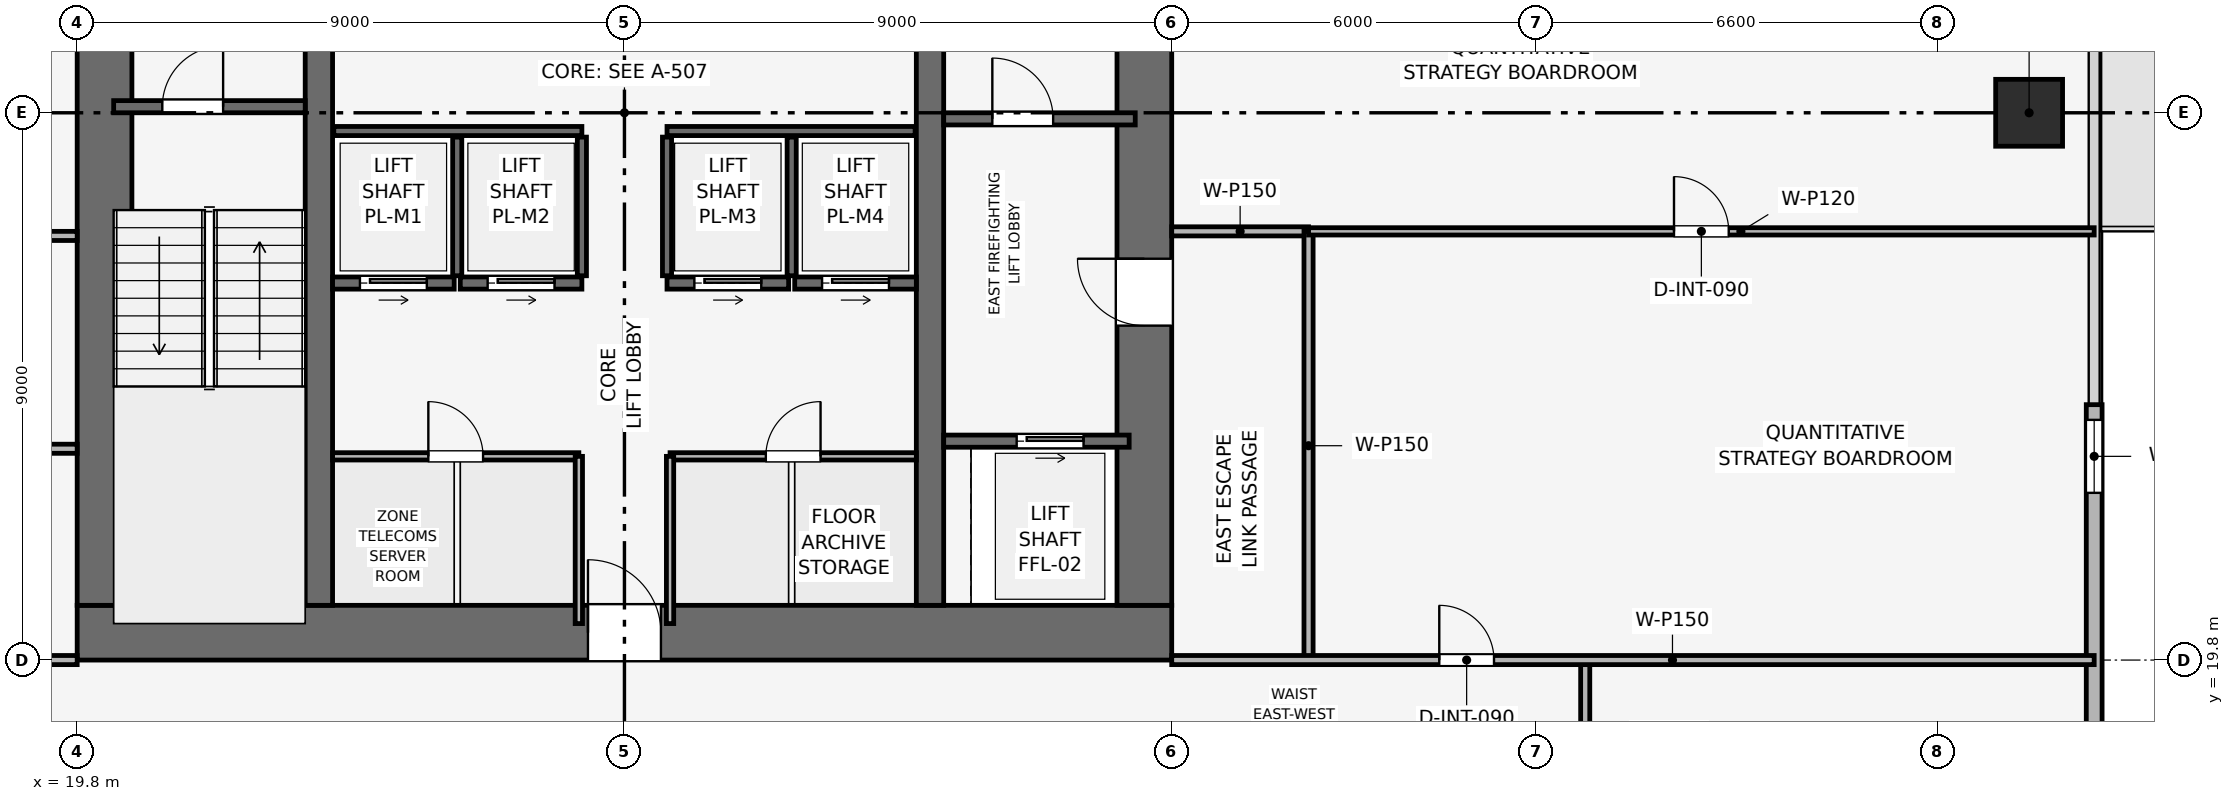
"""IFC4 building model, lengths in metres.
Left out: names, types, materials, properties, quantities, classifications, styles, units other than length and angle.
Written with IfcOpenShell. Run it as: python <this file> out.ifc"""

import sys

from ifc_helpers import new_model, si_unit, direction, frame, frame_2d, origin, origin_2d, place, context, subcontext, project, spatial, rectangle, extrude, element, fill, save


model = new_model("IFC4")
c1 = context("Model", 3, precision=1e-05, world=origin(), true_north=direction((0.0, 1.0)))
c2 = subcontext(c1, "Body", "Model", "MODEL_VIEW")
j1 = project(units=[si_unit("LENGTHUNIT", "METRE"), si_unit("PLANEANGLEUNIT", "RADIAN")], contexts=[c1])
p1 = place(None, origin())
s1 = spatial("IfcSite", under=j1, at=p1, CompositionType="ELEMENT")
p2 = place(p1, origin())
s2 = spatial("IfcBuilding", under=s1, at=p2, CompositionType="ELEMENT")
p3 = place(p2, frame((0.0, 0.0, 142.05)))
s3 = spatial("IfcBuildingStorey", under=s2, at=p3, CompositionType="ELEMENT", Elevation=142.05)
p4 = place(p3, frame((19.8, 20.25, 0.0), z_axis=(0.0, 0.0, 1.0), x_axis=(1.0, 0.0, 0.0)))
e1 = element("IfcWall", 1, at=p4, inside=s3, PredefinedType="SHEAR", context=c2, shape_type="SweptSolid", body=[
    extrude(rectangle(XDim=18.0, YDim=0.9, at=frame_2d((9.0, 0.0))), origin(), (0.0, 0.0, 1.0), 3.75),
])
p5 = place(p4, frame((8.4, 0.0, 0.0)))
e2 = element("IfcOpeningElement", 2, at=p5, cuts=e1, PredefinedType="OPENING", context=c2, shape_type="SweptSolid", body=[
    extrude(rectangle(XDim=1.2, YDim=2.2, at=frame_2d((0.6, 1.1))), frame((0.0, 0.46, 0.0), z_axis=(0.0, -1.0, 0.0), x_axis=(1.0, 0.0, 0.0)), (0.0, 0.0, 1.0), 0.92),
])
p6 = place(p3, frame((20.25, 20.7, 0.0), z_axis=(0.0, 0.0, 1.0), x_axis=(0.0, 1.0, 0.0)))
e3 = element("IfcWall", 3, at=p6, inside=s3, PredefinedType="SHEAR", context=c2, shape_type="SweptSolid", body=[
    extrude(rectangle(XDim=16.2, YDim=0.9, at=frame_2d((8.1, 0.0))), origin(), (0.0, 0.0, 1.0), 3.75),
])
p7 = place(p6, frame((10.1, 0.0, 0.0)))
e4 = element("IfcOpeningElement", 4, at=p7, cuts=e3, PredefinedType="OPENING", context=c2, shape_type="SweptSolid", body=[
    extrude(rectangle(XDim=1.1, YDim=2.15, at=frame_2d((0.55, 1.075))), frame((0.0, 0.46, 0.0), z_axis=(0.0, -1.0, 0.0), x_axis=(1.0, 0.0, 0.0)), (0.0, 0.0, 1.0), 0.92),
])
p8 = place(p3, frame((37.35, 20.7, 0.0), z_axis=(0.0, 0.0, 1.0), x_axis=(0.0, 1.0, 0.0)))
e5 = element("IfcWall", 5, at=p8, inside=s3, PredefinedType="SHEAR", context=c2, shape_type="SweptSolid", body=[
    extrude(rectangle(XDim=16.2, YDim=0.9, at=frame_2d((8.1, 0.0))), origin(), (0.0, 0.0, 1.0), 3.75),
])
p9 = place(p8, frame((4.6, 0.0, 0.0)))
e6 = element("IfcOpeningElement", 6, at=p9, cuts=e5, PredefinedType="OPENING", context=c2, shape_type="SweptSolid", body=[
    extrude(rectangle(XDim=1.1, YDim=2.15, at=frame_2d((0.55, 1.075))), frame((0.0, 0.46, 0.0), z_axis=(0.0, -1.0, 0.0), x_axis=(1.0, 0.0, 0.0)), (0.0, 0.0, 1.0), 0.92),
])
for number, where, z_axis, x_axis in (
    (7, (23.775, 20.7, 0.0), (0.0, 0.0, 1.0), (0.0, 1.0, 0.0)),
    (8, (33.825, 20.7, 0.0), (0.0, 0.0, 1.0), (0.0, 1.0, 0.0)),
):
    element("IfcWall", number, at=place(p3, frame(where, z_axis=z_axis, x_axis=x_axis)), inside=s3, PredefinedType="SHEAR", context=c2, shape_type="SweptSolid", body=[
        extrude(rectangle(XDim=16.2, YDim=0.45, at=frame_2d((8.1, 0.0))), origin(), (0.0, 0.0, 1.0), 3.75),
    ])
p10 = place(p3, frame((51.9, 28.8, 0.003), z_axis=(0.0, 0.0, 1.0), x_axis=(1.0, 0.0, 0.0)))
e9 = element("IfcColumn", 9, at=p10, inside=s3, PredefinedType="COLUMN", context=c2, shape_type="SweptSolid", body=[
    extrude(rectangle(XDim=1.1, YDim=1.1, at=origin_2d()), origin(), (0.0, 0.0, 1.0), 3.489),
])
p11 = place(p3, frame((52.97, 24.0, 0.0), z_axis=(0.0, 0.0, 1.0), x_axis=(0.0, -1.0, 0.0)))
e10 = element("IfcWall", 10, at=p11, inside=s3, PredefinedType="SOLIDWALL", context=c2, shape_type="SweptSolid", body=[
    extrude(rectangle(XDim=12.6, YDim=0.26, at=frame_2d((6.3, 0.0))), origin(), (0.0, 0.0, 1.0), 3.495),
])
p12 = place(p11, frame((0.25, 0.0, 0.9)))
e11 = element("IfcOpeningElement", 11, at=p12, cuts=e10, PredefinedType="OPENING", context=c2, shape_type="SweptSolid", body=[
    extrude(rectangle(XDim=1.2, YDim=2.1, at=frame_2d((0.6, 1.05))), frame((0.0, 0.14, 0.0), z_axis=(0.0, -1.0, 0.0), x_axis=(1.0, 0.0, 0.0)), (0.0, 0.0, 1.0), 0.28),
])
p13 = place(p3, frame((20.4, 28.9, 0.0), z_axis=(0.0, 0.0, 1.0), x_axis=(1.0, 0.0, 0.0)))
e12 = element("IfcWall", 12, at=p13, inside=s3, PredefinedType="SHEAR", context=c2, shape_type="SweptSolid", body=[
    extrude(rectangle(XDim=3.15, YDim=0.2, at=frame_2d((1.575, 0.0))), origin(), (0.0, 0.0, 1.0), 3.495),
])
p14 = place(p13, frame((0.8, 0.0, 0.0)))
e13 = element("IfcOpeningElement", 13, at=p14, cuts=e12, PredefinedType="OPENING", context=c2, shape_type="SweptSolid", body=[
    extrude(rectangle(XDim=1.0, YDim=2.1, at=frame_2d((0.5, 1.05))), frame((0.0, 0.11, 0.0), z_axis=(0.0, -1.0, 0.0), x_axis=(1.0, 0.0, 0.0)), (0.0, 0.0, 1.0), 0.22),
])
p15 = place(p3, frame((34.05, 28.7, 0.0), z_axis=(0.0, 0.0, 1.0), x_axis=(1.0, 0.0, 0.0)))
e14 = element("IfcWall", 14, at=p15, inside=s3, PredefinedType="SHEAR", context=c2, shape_type="SweptSolid", body=[
    extrude(rectangle(XDim=3.15, YDim=0.2, at=frame_2d((1.575, 0.0))), origin(), (0.0, 0.0, 1.0), 3.495),
])
p16 = place(p15, frame((0.8, 0.0, 0.0)))
e15 = element("IfcOpeningElement", 15, at=p16, cuts=e14, PredefinedType="OPENING", context=c2, shape_type="SweptSolid", body=[
    extrude(rectangle(XDim=1.0, YDim=2.1, at=frame_2d((0.5, 1.05))), frame((0.0, 0.11, 0.0), z_axis=(0.0, -1.0, 0.0), x_axis=(1.0, 0.0, 0.0)), (0.0, 0.0, 1.0), 0.22),
])
p17 = place(p3, frame((34.05, 23.4, 0.0), z_axis=(0.0, 0.0, 1.0), x_axis=(1.0, 0.0, 0.0)))
e16 = element("IfcWall", 16, at=p17, inside=s3, PredefinedType="SHEAR", context=c2, shape_type="SweptSolid", body=[
    extrude(rectangle(XDim=3.05, YDim=0.2, at=frame_2d((1.525, 0.0))), origin(), (0.0, 0.0, 1.0), 3.495),
])
p18 = place(p17, frame((1.2, 0.0, 0.0)))
e17 = element("IfcOpeningElement", 17, at=p18, cuts=e16, PredefinedType="OPENING", context=c2, shape_type="SweptSolid", body=[
    extrude(rectangle(XDim=1.1, YDim=2.15, at=frame_2d((0.55, 1.075))), frame((0.0, 0.11, 0.0), z_axis=(0.0, -1.0, 0.0), x_axis=(1.0, 0.0, 0.0)), (0.0, 0.0, 1.0), 0.22),
])
p19 = place(p3, frame((24.0, 26.0, 0.0), z_axis=(0.0, 0.0, 1.0), x_axis=(1.0, 0.0, 0.0)))
e18 = element("IfcWall", 18, at=p19, inside=s3, PredefinedType="SHEAR", context=c2, shape_type="SweptSolid", body=[
    extrude(rectangle(XDim=2.0, YDim=0.2, at=frame_2d((1.0, 0.0))), origin(), (0.0, 0.0, 1.0), 3.495),
])
p20 = place(p19, frame((0.45, 0.0, 0.0)))
e19 = element("IfcOpeningElement", 19, at=p20, cuts=e18, PredefinedType="OPENING", context=c2, shape_type="SweptSolid", body=[
    extrude(rectangle(XDim=1.1, YDim=2.15, at=frame_2d((0.55, 1.075))), frame((0.0, 0.11, 0.0), z_axis=(0.0, -1.0, 0.0), x_axis=(1.0, 0.0, 0.0)), (0.0, 0.0, 1.0), 0.22),
])
p21 = place(p3, frame((26.1, 26.0, 0.0), z_axis=(0.0, 0.0, 1.0), x_axis=(1.0, 0.0, 0.0)))
e20 = element("IfcWall", 20, at=p21, inside=s3, PredefinedType="SHEAR", context=c2, shape_type="SweptSolid", body=[
    extrude(rectangle(XDim=2.0, YDim=0.2, at=frame_2d((1.0, 0.0))), origin(), (0.0, 0.0, 1.0), 3.495),
])
p22 = place(p21, frame((0.45, 0.0, 0.0)))
e21 = element("IfcOpeningElement", 21, at=p22, cuts=e20, PredefinedType="OPENING", context=c2, shape_type="SweptSolid", body=[
    extrude(rectangle(XDim=1.1, YDim=2.15, at=frame_2d((0.55, 1.075))), frame((0.0, 0.11, 0.0), z_axis=(0.0, -1.0, 0.0), x_axis=(1.0, 0.0, 0.0)), (0.0, 0.0, 1.0), 0.22),
])
p23 = place(p3, frame((29.5, 26.0, 0.0), z_axis=(0.0, 0.0, 1.0), x_axis=(1.0, 0.0, 0.0)))
e22 = element("IfcWall", 22, at=p23, inside=s3, PredefinedType="SHEAR", context=c2, shape_type="SweptSolid", body=[
    extrude(rectangle(XDim=2.0, YDim=0.2, at=frame_2d((1.0, 0.0))), origin(), (0.0, 0.0, 1.0), 3.495),
])
p24 = place(p23, frame((0.45, 0.0, 0.0)))
e23 = element("IfcOpeningElement", 23, at=p24, cuts=e22, PredefinedType="OPENING", context=c2, shape_type="SweptSolid", body=[
    extrude(rectangle(XDim=1.1, YDim=2.15, at=frame_2d((0.55, 1.075))), frame((0.0, 0.11, 0.0), z_axis=(0.0, -1.0, 0.0), x_axis=(1.0, 0.0, 0.0)), (0.0, 0.0, 1.0), 0.22),
])
p25 = place(p3, frame((31.6, 26.0, 0.0), z_axis=(0.0, 0.0, 1.0), x_axis=(1.0, 0.0, 0.0)))
e24 = element("IfcWall", 24, at=p25, inside=s3, PredefinedType="SHEAR", context=c2, shape_type="SweptSolid", body=[
    extrude(rectangle(XDim=2.0, YDim=0.2, at=frame_2d((1.0, 0.0))), origin(), (0.0, 0.0, 1.0), 3.495),
])
p26 = place(p25, frame((0.45, 0.0, 0.0)))
e25 = element("IfcOpeningElement", 25, at=p26, cuts=e24, PredefinedType="OPENING", context=c2, shape_type="SweptSolid", body=[
    extrude(rectangle(XDim=1.1, YDim=2.15, at=frame_2d((0.55, 1.075))), frame((0.0, 0.11, 0.0), z_axis=(0.0, -1.0, 0.0), x_axis=(1.0, 0.0, 0.0)), (0.0, 0.0, 1.0), 0.22),
])
for number, where, z_axis, x_axis in (
    (26, (24.02, 28.5, 0.0), (0.0, 0.0, 1.0), (1.0, 0.0, 0.0)),
    (27, (29.5, 28.5, 0.0), (0.0, 0.0, 1.0), (1.0, 0.0, 0.0)),
):
    element("IfcWall", number, at=place(p3, frame(where, z_axis=z_axis, x_axis=x_axis)), inside=s3, PredefinedType="SHEAR", context=c2, shape_type="SweptSolid", body=[
        extrude(rectangle(XDim=4.08, YDim=0.15, at=frame_2d((2.04, 0.0))), origin(), (0.0, 0.0, 1.0), 3.495),
    ])
for number, where, z_axis, x_axis in (
    (28, (26.05, 26.12, 0.0), (0.0, 0.0, 1.0), (0.0, 1.0, 0.0)),
    (29, (28.1, 26.12, 0.0), (0.0, 0.0, 1.0), (0.0, 1.0, 0.0)),
    (30, (29.5, 26.12, 0.0), (0.0, 0.0, 1.0), (0.0, 1.0, 0.0)),
    (31, (31.55, 26.12, 0.0), (0.0, 0.0, 1.0), (0.0, 1.0, 0.0)),
):
    element("IfcWall", number, at=place(p3, frame(where, z_axis=z_axis, x_axis=x_axis)), inside=s3, PredefinedType="SHEAR", context=c2, shape_type="SweptSolid", body=[
        extrude(rectangle(XDim=2.28, YDim=0.15, at=frame_2d((1.14, 0.0))), origin(), (0.0, 0.0, 1.0), 3.495),
    ])
p27 = place(p3, frame((24.0, 23.15, 0.0), z_axis=(0.0, 0.0, 1.0), x_axis=(1.0, 0.0, 0.0)))
e32 = element("IfcWall", 32, at=p27, inside=s3, PredefinedType="PARTITIONING", context=c2, shape_type="SweptSolid", body=[
    extrude(rectangle(XDim=4.05, YDim=0.12, at=frame_2d((2.025, 0.0))), origin(), (0.0, 0.0, 1.0), 3.495),
])
p28 = place(p27, frame((1.575, 0.0, 0.0)))
e33 = element("IfcOpeningElement", 33, at=p28, cuts=e32, PredefinedType="OPENING", context=c2, shape_type="SweptSolid", body=[
    extrude(rectangle(XDim=0.9, YDim=2.1, at=frame_2d((0.45, 1.05))), frame((0.0, 0.07, 0.0), z_axis=(0.0, -1.0, 0.0), x_axis=(1.0, 0.0, 0.0)), (0.0, 0.0, 1.0), 0.14),
])
p29 = place(p3, frame((28.05, 20.4, 0.0), z_axis=(0.0, 0.0, 1.0), x_axis=(0.0, 1.0, 0.0)))
e34 = element("IfcWall", 34, at=p29, inside=s3, PredefinedType="PARTITIONING", context=c2, shape_type="SweptSolid", body=[
    extrude(rectangle(XDim=2.75, YDim=0.12, at=frame_2d((1.375, 0.0))), origin(), (0.0, 0.0, 1.0), 3.495),
])
p30 = place(p3, frame((29.55, 23.15, 0.0), z_axis=(0.0, 0.0, 1.0), x_axis=(1.0, 0.0, 0.0)))
e35 = element("IfcWall", 35, at=p30, inside=s3, PredefinedType="PARTITIONING", context=c2, shape_type="SweptSolid", body=[
    extrude(rectangle(XDim=4.05, YDim=0.12, at=frame_2d((2.025, 0.0))), origin(), (0.0, 0.0, 1.0), 3.495),
])
p31 = place(p30, frame((1.575, 0.0, 0.0)))
e36 = element("IfcOpeningElement", 36, at=p31, cuts=e35, PredefinedType="OPENING", context=c2, shape_type="SweptSolid", body=[
    extrude(rectangle(XDim=0.9, YDim=2.1, at=frame_2d((0.45, 1.05))), frame((0.0, 0.07, 0.0), z_axis=(0.0, -1.0, 0.0), x_axis=(1.0, 0.0, 0.0)), (0.0, 0.0, 1.0), 0.14),
])
p32 = place(p3, frame((29.55, 20.4, 0.0), z_axis=(0.0, 0.0, 1.0), x_axis=(0.0, 1.0, 0.0)))
e37 = element("IfcWall", 37, at=p32, inside=s3, PredefinedType="PARTITIONING", context=c2, shape_type="SweptSolid", body=[
    extrude(rectangle(XDim=2.75, YDim=0.12, at=frame_2d((1.375, 0.0))), origin(), (0.0, 0.0, 1.0), 3.495),
])
p33 = place(p3, frame((15.4, 19.8, 0.0), z_axis=(0.0, 0.0, 1.0), x_axis=(1.0, 0.0, 0.0)))
e38 = element("IfcWall", 38, at=p33, inside=s3, PredefinedType="PARTITIONING", context=c2, shape_type="SweptSolid", body=[
    extrude(rectangle(XDim=4.4, YDim=0.15, at=frame_2d((2.2, 0.0))), origin(), (0.0, 0.0, 1.0), 3.03),
])
for number, where, z_axis, x_axis in (
    (39, (15.4, 23.275, 0.0), (0.0, 0.0, 1.0), (1.0, 0.0, 0.0)),
    (40, (15.4, 26.775, 0.0), (0.0, 0.0, 1.0), (1.0, 0.0, 0.0)),
):
    element("IfcWall", number, at=place(p3, frame(where, z_axis=z_axis, x_axis=x_axis)), inside=s3, PredefinedType="PARTITIONING", context=c2, shape_type="SweptSolid", body=[
        extrude(rectangle(XDim=4.4, YDim=0.15, at=frame_2d((2.2, 0.0))), origin(), (0.0, 0.0, 1.0), 3.495),
    ])
p34 = place(p3, frame((37.8, 26.85, 0.0), z_axis=(0.0, 0.0, 1.0), x_axis=(1.0, 0.0, 0.0)))
e41 = element("IfcWall", 41, at=p34, inside=s3, PredefinedType="PARTITIONING", context=c2, shape_type="SweptSolid", body=[
    extrude(rectangle(XDim=2.25, YDim=0.15, at=frame_2d((1.125, 0.0))), origin(), (0.0, 0.0, 1.0), 3.495),
])
p35 = place(p3, frame((40.05, 19.8, 0.0), z_axis=(0.0, 0.0, 1.0), x_axis=(0.0, 1.0, 0.0)))
e42 = element("IfcWall", 42, at=p35, inside=s3, PredefinedType="PARTITIONING", context=c2, shape_type="SweptSolid", body=[
    extrude(rectangle(XDim=7.05, YDim=0.15, at=frame_2d((3.525, 0.0))), origin(), (0.0, 0.0, 1.0), 3.03),
])
p36 = place(p3, frame((40.05, 26.85, 0.0), z_axis=(0.0, 0.0, 1.0), x_axis=(1.0, 0.0, 0.0)))
e43 = element("IfcWall", 43, at=p36, inside=s3, PredefinedType="PARTITIONING", context=c2, shape_type="SweptSolid", body=[
    extrude(rectangle(XDim=12.92, YDim=0.12, at=frame_2d((6.46, 0.0))), origin(), (0.0, 0.0, 1.0), 2.98),
])
p37 = place(p36, frame((6.01, 0.0, 0.0)))
e44 = element("IfcOpeningElement", 44, at=p37, cuts=e43, PredefinedType="OPENING", context=c2, shape_type="SweptSolid", body=[
    extrude(rectangle(XDim=0.9, YDim=2.1, at=frame_2d((0.45, 1.05))), frame((0.0, 0.07, 0.0), z_axis=(0.0, -1.0, 0.0), x_axis=(1.0, 0.0, 0.0)), (0.0, 0.0, 1.0), 0.14),
])
p38 = place(p3, frame((44.6, 17.4, 0.0), z_axis=(0.0, 0.0, 1.0), x_axis=(0.0, 1.0, 0.0)))
e45 = element("IfcWall", 45, at=p38, inside=s3, PredefinedType="PARTITIONING", context=c2, shape_type="SweptSolid", body=[
    extrude(rectangle(XDim=2.4, YDim=0.15, at=frame_2d((1.2, 0.0))), origin(), (0.0, 0.0, 1.0), 3.495),
])
p39 = place(p3, frame((37.8, 19.8, 0.0), z_axis=(0.0, 0.0, 1.0), x_axis=(1.0, 0.0, 0.0)))
e46 = element("IfcWall", 46, at=p39, inside=s3, PredefinedType="PARTITIONING", context=c2, shape_type="SweptSolid", body=[
    extrude(rectangle(XDim=15.17, YDim=0.15, at=frame_2d((7.585, 0.0))), origin(), (0.0, 0.0, 1.0), 2.98),
])
p40 = place(p39, frame((4.4, 0.0, 0.0)))
e47 = element("IfcOpeningElement", 47, at=p40, cuts=e46, PredefinedType="OPENING", context=c2, shape_type="SweptSolid", body=[
    extrude(rectangle(XDim=0.9, YDim=2.1, at=frame_2d((0.45, 1.05))), frame((0.0, 0.085, 0.0), z_axis=(0.0, -1.0, 0.0), x_axis=(1.0, 0.0, 0.0)), (0.0, 0.0, 1.0), 0.17),
])
p41 = place(p12, origin())
e48 = element("IfcWindow", 48, at=p41, inside=s3, PartitioningType="SINGLE_PANEL", PredefinedType="WINDOW", context=c2, shape_type="SweptSolid", body=[
    extrude(rectangle(XDim=1.2, YDim=2.1, at=frame_2d((0.6, 1.05))), frame((0.0, 0.03, 0.0), z_axis=(0.0, -1.0, 0.0), x_axis=(1.0, 0.0, 0.0)), (0.0, 0.0, 1.0), 0.06),
])
fill(e11, e48)
p42 = place(p14, origin())
e49 = element("IfcDoor", 49, at=p42, inside=s3, OperationType="SINGLE_SWING_RIGHT", PredefinedType="DOOR", context=c2, shape_type="SweptSolid", body=[
    extrude(rectangle(XDim=1.0, YDim=2.1, at=frame_2d((0.5, 1.05))), frame((0.0, 0.025, 0.0), z_axis=(0.0, -1.0, 0.0), x_axis=(1.0, 0.0, 0.0)), (0.0, 0.0, 1.0), 0.05),
])
fill(e13, e49)
p43 = place(p16, origin())
e50 = element("IfcDoor", 50, at=p43, inside=s3, OperationType="SINGLE_SWING_LEFT", PredefinedType="DOOR", context=c2, shape_type="SweptSolid", body=[
    extrude(rectangle(XDim=1.0, YDim=2.1, at=frame_2d((0.5, 1.05))), frame((0.0, 0.025, 0.0), z_axis=(0.0, -1.0, 0.0), x_axis=(1.0, 0.0, 0.0)), (0.0, 0.0, 1.0), 0.05),
])
fill(e15, e50)
p44 = place(p18, origin())
e51 = element("IfcDoor", 51, at=p44, inside=s3, OperationType="SLIDING_TO_RIGHT", PredefinedType="DOOR", context=c2, shape_type="SweptSolid", body=[
    extrude(rectangle(XDim=1.1, YDim=2.15, at=frame_2d((0.55, 1.075))), frame((0.0, 0.025, 0.0), z_axis=(0.0, -1.0, 0.0), x_axis=(1.0, 0.0, 0.0)), (0.0, 0.0, 1.0), 0.05),
])
fill(e17, e51)
p45 = place(p20, origin())
e52 = element("IfcDoor", 52, at=p45, inside=s3, OperationType="SLIDING_TO_RIGHT", PredefinedType="DOOR", context=c2, shape_type="SweptSolid", body=[
    extrude(rectangle(XDim=1.1, YDim=2.15, at=frame_2d((0.55, 1.075))), frame((0.0, 0.025, 0.0), z_axis=(0.0, -1.0, 0.0), x_axis=(1.0, 0.0, 0.0)), (0.0, 0.0, 1.0), 0.05),
])
fill(e19, e52)
p46 = place(p22, origin())
e53 = element("IfcDoor", 53, at=p46, inside=s3, OperationType="SLIDING_TO_RIGHT", PredefinedType="DOOR", context=c2, shape_type="SweptSolid", body=[
    extrude(rectangle(XDim=1.1, YDim=2.15, at=frame_2d((0.55, 1.075))), frame((0.0, 0.025, 0.0), z_axis=(0.0, -1.0, 0.0), x_axis=(1.0, 0.0, 0.0)), (0.0, 0.0, 1.0), 0.05),
])
fill(e21, e53)
p47 = place(p24, origin())
e54 = element("IfcDoor", 54, at=p47, inside=s3, OperationType="SLIDING_TO_RIGHT", PredefinedType="DOOR", context=c2, shape_type="SweptSolid", body=[
    extrude(rectangle(XDim=1.1, YDim=2.15, at=frame_2d((0.55, 1.075))), frame((0.0, 0.025, 0.0), z_axis=(0.0, -1.0, 0.0), x_axis=(1.0, 0.0, 0.0)), (0.0, 0.0, 1.0), 0.05),
])
fill(e23, e54)
p48 = place(p26, origin())
e55 = element("IfcDoor", 55, at=p48, inside=s3, OperationType="SLIDING_TO_RIGHT", PredefinedType="DOOR", context=c2, shape_type="SweptSolid", body=[
    extrude(rectangle(XDim=1.1, YDim=2.15, at=frame_2d((0.55, 1.075))), frame((0.0, 0.025, 0.0), z_axis=(0.0, -1.0, 0.0), x_axis=(1.0, 0.0, 0.0)), (0.0, 0.0, 1.0), 0.05),
])
fill(e25, e55)
p49 = place(p28, origin())
e56 = element("IfcDoor", 56, at=p49, inside=s3, OperationType="SINGLE_SWING_LEFT", PredefinedType="DOOR", context=c2, shape_type="SweptSolid", body=[
    extrude(rectangle(XDim=0.9, YDim=2.1, at=frame_2d((0.45, 1.05))), frame((0.0, 0.025, 0.0), z_axis=(0.0, -1.0, 0.0), x_axis=(1.0, 0.0, 0.0)), (0.0, 0.0, 1.0), 0.05),
])
fill(e33, e56)
p50 = place(p31, origin())
e57 = element("IfcDoor", 57, at=p50, inside=s3, OperationType="SINGLE_SWING_RIGHT", PredefinedType="DOOR", context=c2, shape_type="SweptSolid", body=[
    extrude(rectangle(XDim=0.9, YDim=2.1, at=frame_2d((0.45, 1.05))), frame((0.0, 0.025, 0.0), z_axis=(0.0, -1.0, 0.0), x_axis=(1.0, 0.0, 0.0)), (0.0, 0.0, 1.0), 0.05),
])
fill(e36, e57)
p51 = place(p37, origin())
e58 = element("IfcDoor", 58, at=p51, inside=s3, OperationType="SINGLE_SWING_LEFT", PredefinedType="DOOR", context=c2, shape_type="SweptSolid", body=[
    extrude(rectangle(XDim=0.9, YDim=2.1, at=frame_2d((0.45, 1.05))), frame((0.0, 0.025, 0.0), z_axis=(0.0, -1.0, 0.0), x_axis=(1.0, 0.0, 0.0)), (0.0, 0.0, 1.0), 0.05),
])
fill(e44, e58)
p52 = place(p40, origin())
e59 = element("IfcDoor", 59, at=p52, inside=s3, OperationType="SINGLE_SWING_LEFT", PredefinedType="DOOR", context=c2, shape_type="SweptSolid", body=[
    extrude(rectangle(XDim=0.9, YDim=2.1, at=frame_2d((0.45, 1.05))), frame((0.0, 0.025, 0.0), z_axis=(0.0, -1.0, 0.0), x_axis=(1.0, 0.0, 0.0)), (0.0, 0.0, 1.0), 0.05),
])
fill(e47, e59)
p53 = place(p9, origin())
e60 = element("IfcDoor", 60, at=p53, inside=s3, OperationType="SINGLE_SWING_RIGHT", PredefinedType="DOOR", context=c2, shape_type="SweptSolid", body=[
    extrude(rectangle(XDim=1.1, YDim=2.15, at=frame_2d((0.55, 1.075))), frame((0.0, 0.025, 0.0), z_axis=(0.0, -1.0, 0.0), x_axis=(1.0, 0.0, 0.0)), (0.0, 0.0, 1.0), 0.05),
])
fill(e6, e60)
p54 = place(p5, origin())
e61 = element("IfcDoor", 61, at=p54, inside=s3, OperationType="SINGLE_SWING_LEFT", PredefinedType="DOOR", context=c2, shape_type="SweptSolid", body=[
    extrude(rectangle(XDim=1.2, YDim=2.2, at=frame_2d((0.6, 1.1))), frame((0.0, 0.025, 0.0), z_axis=(0.0, -1.0, 0.0), x_axis=(1.0, 0.0, 0.0)), (0.0, 0.0, 1.0), 0.05),
])
fill(e2, e61)
save(model, sys.argv[1])
